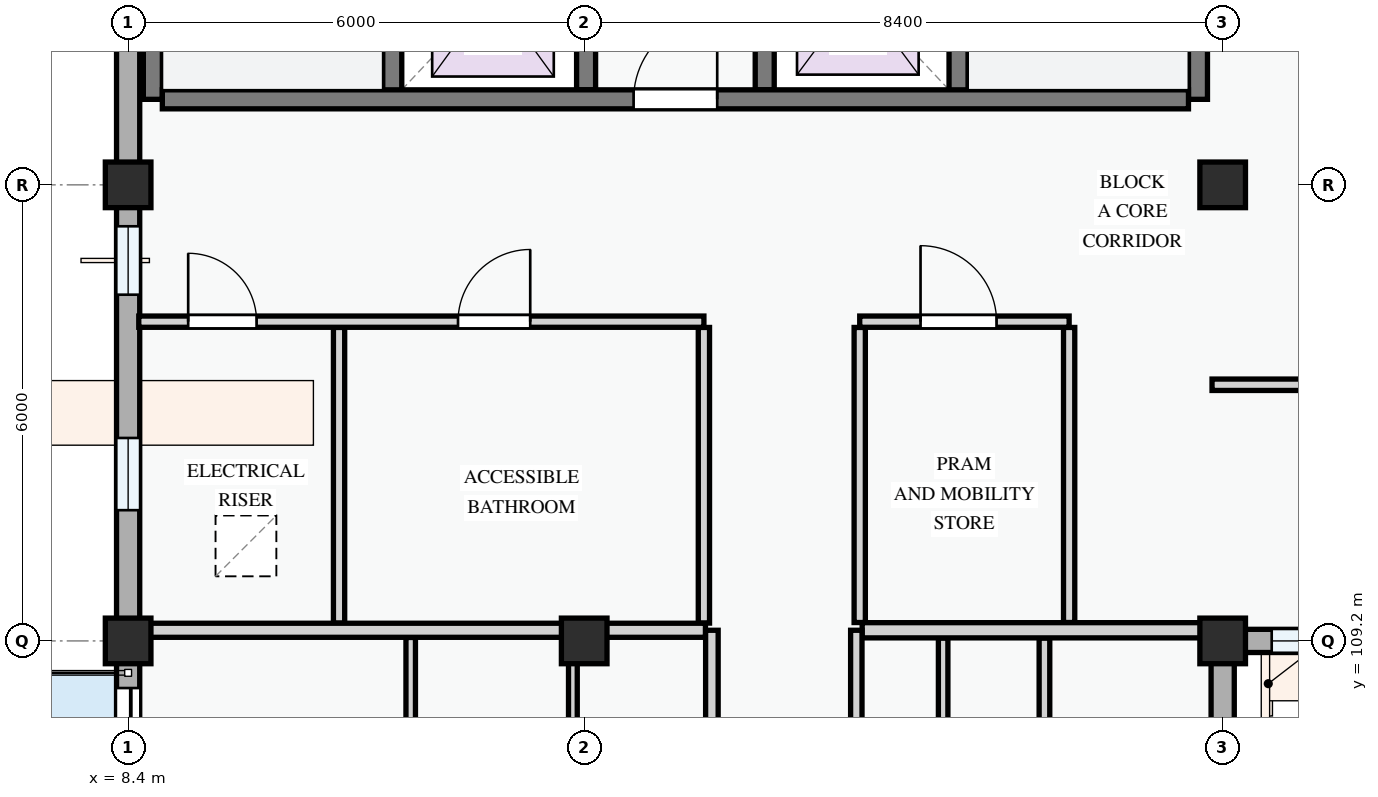
"""IFC4 building model, lengths in metres.
Left out: names, types, materials, properties, quantities, classifications, styles, units other than length and angle.
Written with IfcOpenShell. Run it as: python <this file> out.ifc"""

import sys

from ifc_helpers import new_model, si_unit, direction, frame, frame_2d, origin, origin_2d, place, context, subcontext, project, spatial, rectangle, extrude, element, fill, save


model = new_model("IFC4")
c1 = context("Model", 3, precision=1e-05, world=origin(), true_north=direction((0.0, 1.0)))
c2 = subcontext(c1, "Body", "Model", "MODEL_VIEW")
j1 = project(units=[si_unit("LENGTHUNIT", "METRE"), si_unit("PLANEANGLEUNIT", "RADIAN")], contexts=[c1])
p1 = place(None, origin())
s1 = spatial("IfcSite", under=j1, at=p1, CompositionType="ELEMENT")
p2 = place(p1, origin())
s2 = spatial("IfcBuilding", under=s1, at=p2, CompositionType="ELEMENT")
p3 = place(p2, frame((0.0, 0.0, 24.6)))
s3 = spatial("IfcBuildingStorey", under=s2, at=p3, CompositionType="ELEMENT", Elevation=24.6)
for number, where, z_axis, x_axis in (
    (1, (8.4, 109.2, 0.0), (0.0, 0.0, 1.0), (1.0, 0.0, 0.0)),
    (2, (8.4, 115.2, 0.0), (0.0, 0.0, 1.0), (1.0, 0.0, 0.0)),
    (3, (14.4, 109.2, 0.0), (0.0, 0.0, 1.0), (1.0, 0.0, 0.0)),
    (4, (22.8, 109.2, 0.0), (0.0, 0.0, 1.0), (1.0, 0.0, 0.0)),
    (5, (22.8, 115.2, 0.0), (0.0, 0.0, 1.0), (1.0, 0.0, 0.0)),
):
    element("IfcColumn", number, at=place(p3, frame(where, z_axis=z_axis, x_axis=x_axis)), inside=s3, PredefinedType="COLUMN", context=c2, shape_type="SweptSolid", body=[
        extrude(rectangle(XDim=0.6, YDim=0.6, at=origin_2d()), origin(), (0.0, 0.0, 1.0), 3.3),
    ])
p4 = place(p3, frame((22.8, 109.2, 0.0), z_axis=(0.0, 0.0, 1.0), x_axis=(1.0, 0.0, 0.0)))
e6 = element("IfcWall", 6, at=p4, inside=s3, PredefinedType="STANDARD", context=c2, shape_type="SweptSolid", body=[
    extrude(rectangle(XDim=6.0, YDim=0.305, at=frame_2d((3.0, 0.0))), origin(), (0.0, 0.0, 1.0), 2.475),
])
p5 = place(p4, frame((0.645, 0.0, 0.78)))
e7 = element("IfcOpeningElement", 7, at=p5, cuts=e6, PredefinedType="OPENING", context=c2, shape_type="SweptSolid", body=[
    extrude(rectangle(XDim=1.25, YDim=1.45, at=frame_2d((0.625, 0.725))), frame((0.0, 0.163, 0.0), z_axis=(0.0, -1.0, 0.0), x_axis=(1.0, 0.0, 0.0)), (0.0, 0.0, 1.0), 0.325),
])
p6 = place(p4, frame((2.87, 0.0, 0.78)))
e8 = element("IfcOpeningElement", 8, at=p6, cuts=e6, PredefinedType="OPENING", context=c2, shape_type="SweptSolid", body=[
    extrude(rectangle(XDim=2.42, YDim=1.52, at=frame_2d((1.21, 0.76))), frame((0.0, 0.163, 0.0), z_axis=(0.0, -1.0, 0.0), x_axis=(1.0, 0.0, 0.0)), (0.0, 0.0, 1.0), 0.325),
])
p7 = place(p3, frame((8.4, 123.6, 0.0), z_axis=(0.0, 0.0, 1.0), x_axis=(0.0, -1.0, 0.0)))
e9 = element("IfcWall", 9, at=p7, inside=s3, PredefinedType="STANDARD", context=c2, shape_type="SweptSolid", body=[
    extrude(rectangle(XDim=8.4, YDim=0.305, at=frame_2d((4.2, 0.0))), origin(), (0.0, 0.0, 1.0), 2.425),
])
p8 = place(p7, frame((1.236, 0.0, 0.78)))
e10 = element("IfcOpeningElement", 10, at=p8, cuts=e9, PredefinedType="OPENING", context=c2, shape_type="SweptSolid", body=[
    extrude(rectangle(XDim=1.52, YDim=1.42, at=frame_2d((0.76, 0.71))), frame((0.0, 0.163, 0.0), z_axis=(0.0, -1.0, 0.0), x_axis=(1.0, 0.0, 0.0)), (0.0, 0.0, 1.0), 0.325),
])
p9 = place(p7, frame((4.529, 0.0, 0.78)))
e11 = element("IfcOpeningElement", 11, at=p9, cuts=e9, PredefinedType="OPENING", context=c2, shape_type="SweptSolid", body=[
    extrude(rectangle(XDim=1.88, YDim=1.52, at=frame_2d((0.94, 0.76))), frame((0.0, 0.163, 0.0), z_axis=(0.0, -1.0, 0.0), x_axis=(1.0, 0.0, 0.0)), (0.0, 0.0, 1.0), 0.325),
])
p10 = place(p3, frame((8.4, 115.2, 0.0), z_axis=(0.0, 0.0, 1.0), x_axis=(0.0, -1.0, 0.0)))
e12 = element("IfcWall", 12, at=p10, inside=s3, PredefinedType="STANDARD", context=c2, shape_type="SweptSolid", body=[
    extrude(rectangle(XDim=6.0, YDim=0.305, at=frame_2d((3.0, 0.0))), origin(), (0.0, 0.0, 1.0), 2.575),
])
p11 = place(p10, frame((0.545, 0.0, 0.78)))
e13 = element("IfcOpeningElement", 13, at=p11, cuts=e12, PredefinedType="OPENING", context=c2, shape_type="SweptSolid", body=[
    extrude(rectangle(XDim=0.9, YDim=1.2, at=frame_2d((0.45, 0.6))), frame((0.0, 0.163, 0.0), z_axis=(0.0, -1.0, 0.0), x_axis=(1.0, 0.0, 0.0)), (0.0, 0.0, 1.0), 0.325),
])
p12 = place(p10, frame((3.33, 0.0, 0.78)))
e14 = element("IfcOpeningElement", 14, at=p12, cuts=e12, PredefinedType="OPENING", context=c2, shape_type="SweptSolid", body=[
    extrude(rectangle(XDim=0.95, YDim=1.15, at=frame_2d((0.475, 0.575))), frame((0.0, 0.163, 0.0), z_axis=(0.0, -1.0, 0.0), x_axis=(1.0, 0.0, 0.0)), (0.0, 0.0, 1.0), 0.325),
])
p13 = place(p3, frame((8.4, 109.2, 0.0), z_axis=(0.0, 0.0, 1.0), x_axis=(0.0, -1.0, 0.0)))
e15 = element("IfcWall", 15, at=p13, inside=s3, PredefinedType="STANDARD", context=c2, shape_type="SweptSolid", body=[
    extrude(rectangle(XDim=8.4, YDim=0.305, at=frame_2d((4.2, 0.0))), origin(), (0.0, 0.0, 1.0), 2.425),
])
p14 = place(p13, frame((0.62, 0.0, 0.0)))
e16 = element("IfcOpeningElement", 16, at=p14, cuts=e15, PredefinedType="OPENING", context=c2, shape_type="SweptSolid", body=[
    extrude(rectangle(XDim=1.4, YDim=2.2, at=frame_2d((0.7, 1.1))), frame((0.0, 0.163, 0.0), z_axis=(0.0, -1.0, 0.0), x_axis=(1.0, 0.0, 0.0)), (0.0, 0.0, 1.0), 0.325),
])
p15 = place(p13, frame((2.532, 0.0, 0.78)))
e17 = element("IfcOpeningElement", 17, at=p15, cuts=e15, PredefinedType="OPENING", context=c2, shape_type="SweptSolid", body=[
    extrude(rectangle(XDim=2.0, YDim=1.5, at=frame_2d((1.0, 0.75))), frame((0.0, 0.163, 0.0), z_axis=(0.0, -1.0, 0.0), x_axis=(1.0, 0.0, 0.0)), (0.0, 0.0, 1.0), 0.325),
])
p16 = place(p13, frame((5.393, 0.0, 0.78)))
e18 = element("IfcOpeningElement", 18, at=p16, cuts=e15, PredefinedType="OPENING", context=c2, shape_type="SweptSolid", body=[
    extrude(rectangle(XDim=2.42, YDim=1.52, at=frame_2d((1.21, 0.76))), frame((0.0, 0.163, 0.0), z_axis=(0.0, -1.0, 0.0), x_axis=(1.0, 0.0, 0.0)), (0.0, 0.0, 1.0), 0.325),
])
p17 = place(p3, frame((22.8, 100.8, 0.0), z_axis=(0.0, 0.0, 1.0), x_axis=(0.0, 1.0, 0.0)))
e19 = element("IfcWall", 19, at=p17, inside=s3, PredefinedType="STANDARD", context=c2, shape_type="SweptSolid", body=[
    extrude(rectangle(XDim=8.4, YDim=0.305, at=frame_2d((4.2, 0.0))), origin(), (0.0, 0.0, 1.0), 2.425),
])
p18 = place(p17, frame((1.145, 0.0, 0.78)))
e20 = element("IfcOpeningElement", 20, at=p18, cuts=e19, PredefinedType="OPENING", context=c2, shape_type="SweptSolid", body=[
    extrude(rectangle(XDim=1.1, YDim=1.3, at=frame_2d((0.55, 0.65))), frame((0.0, 0.163, 0.0), z_axis=(0.0, -1.0, 0.0), x_axis=(1.0, 0.0, 0.0)), (0.0, 0.0, 1.0), 0.325),
])
p19 = place(p17, frame((3.647, 0.0, 0.78)))
e21 = element("IfcOpeningElement", 21, at=p19, cuts=e19, PredefinedType="OPENING", context=c2, shape_type="SweptSolid", body=[
    extrude(rectangle(XDim=1.68, YDim=1.46, at=frame_2d((0.84, 0.73))), frame((0.0, 0.163, 0.0), z_axis=(0.0, -1.0, 0.0), x_axis=(1.0, 0.0, 0.0)), (0.0, 0.0, 1.0), 0.325),
])
p20 = place(p17, frame((6.472, 0.0, 0.78)))
e22 = element("IfcOpeningElement", 22, at=p20, cuts=e19, PredefinedType="OPENING", context=c2, shape_type="SweptSolid", body=[
    extrude(rectangle(XDim=0.9, YDim=1.2, at=frame_2d((0.45, 0.6))), frame((0.0, 0.163, 0.0), z_axis=(0.0, -1.0, 0.0), x_axis=(1.0, 0.0, 0.0)), (0.0, 0.0, 1.0), 0.325),
])
p21 = place(p3, frame((11.875, 123.25, 0.0), z_axis=(0.0, 0.0, 1.0), x_axis=(0.0, -1.0, 0.0)))
e23 = element("IfcWall", 23, at=p21, inside=s3, PredefinedType="SHEAR", context=c2, shape_type="SweptSolid", body=[
    extrude(rectangle(XDim=6.925, YDim=0.25, at=frame_2d((3.462, 0.0))), origin(), (0.0, 0.0, 1.0), 3.0),
])
p22 = place(p21, frame((0.35, 0.0, 0.0)))
e24 = element("IfcOpeningElement", 24, at=p22, cuts=e23, PredefinedType="OPENING", context=c2, shape_type="SweptSolid", body=[
    extrude(rectangle(XDim=0.95, YDim=2.1, at=frame_2d((0.475, 1.05))), frame((0.0, 0.135, 0.0), z_axis=(0.0, -1.0, 0.0), x_axis=(1.0, 0.0, 0.0)), (0.0, 0.0, 1.0), 0.27),
])
p23 = place(p3, frame((8.725, 123.4, 0.0), z_axis=(0.0, 0.0, 1.0), x_axis=(0.0, -1.0, 0.0)))
e25 = element("IfcWall", 25, at=p23, inside=s3, PredefinedType="SHEAR", context=c2, shape_type="SweptSolid", body=[
    extrude(rectangle(XDim=7.075, YDim=0.25, at=frame_2d((3.538, 0.0))), origin(), (0.0, 0.0, 1.0), 3.0),
])
p24 = place(p3, frame((22.475, 123.25, 0.0), z_axis=(0.0, 0.0, 1.0), x_axis=(0.0, -1.0, 0.0)))
e26 = element("IfcWall", 26, at=p24, inside=s3, PredefinedType="SHEAR", context=c2, shape_type="SweptSolid", body=[
    extrude(rectangle(XDim=6.925, YDim=0.25, at=frame_2d((3.462, 0.0))), origin(), (0.0, 0.0, 1.0), 3.0),
])
p25 = place(p3, frame((19.325, 123.25, 0.0), z_axis=(0.0, 0.0, 1.0), x_axis=(0.0, -1.0, 0.0)))
e27 = element("IfcWall", 27, at=p25, inside=s3, PredefinedType="SHEAR", context=c2, shape_type="SweptSolid", body=[
    extrude(rectangle(XDim=6.925, YDim=0.25, at=frame_2d((3.462, 0.0))), origin(), (0.0, 0.0, 1.0), 3.0),
])
p26 = place(p25, frame((0.35, 0.0, 0.0)))
e28 = element("IfcOpeningElement", 28, at=p26, cuts=e27, PredefinedType="OPENING", context=c2, shape_type="SweptSolid", body=[
    extrude(rectangle(XDim=0.95, YDim=2.1, at=frame_2d((0.475, 1.05))), frame((0.0, 0.135, 0.0), z_axis=(0.0, -1.0, 0.0), x_axis=(1.0, 0.0, 0.0)), (0.0, 0.0, 1.0), 0.27),
])
for number, where, z_axis, x_axis in (
    (29, (14.425, 118.875, 0.0), (0.0, 0.0, 1.0), (0.0, -1.0, 0.0)),
    (30, (16.775, 118.875, 0.0), (0.0, 0.0, 1.0), (0.0, -1.0, 0.0)),
):
    element("IfcWall", number, at=place(p3, frame(where, z_axis=z_axis, x_axis=x_axis)), inside=s3, PredefinedType="SHEAR", context=c2, shape_type="SweptSolid", body=[
        extrude(rectangle(XDim=2.425, YDim=0.25, at=frame_2d((1.212, 0.0))), origin(), (0.0, 0.0, 1.0), 3.0),
    ])
p27 = place(p3, frame((8.85, 116.325, 0.0), z_axis=(0.0, 0.0, 1.0), x_axis=(1.0, 0.0, 0.0)))
e31 = element("IfcWall", 31, at=p27, inside=s3, PredefinedType="SHEAR", context=c2, shape_type="SweptSolid", body=[
    extrude(rectangle(XDim=13.5, YDim=0.25, at=frame_2d((6.75, 0.0))), origin(), (0.0, 0.0, 1.0), 3.0),
])
p28 = place(p27, frame((6.2, 0.0, 0.0)))
e32 = element("IfcOpeningElement", 32, at=p28, cuts=e31, PredefinedType="OPENING", context=c2, shape_type="SweptSolid", body=[
    extrude(rectangle(XDim=1.1, YDim=2.15, at=frame_2d((0.55, 1.075))), frame((0.0, 0.135, 0.0), z_axis=(0.0, -1.0, 0.0), x_axis=(1.0, 0.0, 0.0)), (0.0, 0.0, 1.0), 0.27),
])
for number, where, z_axis, x_axis in (
    (33, (11.175, 113.324, 0.0), (0.0, 0.0, 1.0), (0.0, -1.0, 0.0)),
    (34, (15.975, 113.324, 0.0), (0.0, 0.0, 1.0), (0.0, -1.0, 0.0)),
):
    element("IfcWall", number, at=place(p3, frame(where, z_axis=z_axis, x_axis=x_axis)), inside=s3, PredefinedType="PARTITIONING", context=c2, shape_type="SweptSolid", body=[
        extrude(rectangle(XDim=3.889, YDim=0.148, at=frame_2d((1.945, 0.0))), origin(), (0.0, 0.0, 1.0), 3.0),
    ])
for number, where, z_axis, x_axis in (
    (35, (18.025, 113.324, 0.0), (0.0, 0.0, 1.0), (0.0, -1.0, 0.0)),
    (36, (20.78, 113.324, 0.0), (0.0, 0.0, 1.0), (0.0, -1.0, 0.0)),
):
    element("IfcWall", number, at=place(p3, frame(where, z_axis=z_axis, x_axis=x_axis)), inside=s3, PredefinedType="PARTITIONING", context=c2, shape_type="SweptSolid", body=[
        extrude(rectangle(XDim=3.882, YDim=0.148, at=frame_2d((1.941, 0.0))), origin(), (0.0, 0.0, 1.0), 3.0),
    ])
p29 = place(p3, frame((8.54, 113.4, 0.0), z_axis=(0.0, 0.0, 1.0), x_axis=(1.0, 0.0, 0.0)))
e37 = element("IfcWall", 37, at=p29, inside=s3, PredefinedType="PARTITIONING", context=c2, shape_type="SweptSolid", body=[
    extrude(rectangle(XDim=7.435, YDim=0.148, at=frame_2d((3.718, 0.0))), origin(), (0.0, 0.0, 1.0), 3.0),
])
p30 = place(p29, frame((0.65, 0.0, 0.0)))
e38 = element("IfcOpeningElement", 38, at=p30, cuts=e37, PredefinedType="OPENING", context=c2, shape_type="SweptSolid", body=[
    extrude(rectangle(XDim=0.9, YDim=2.1, at=frame_2d((0.45, 1.05))), frame((0.0, 0.084, 0.0), z_axis=(0.0, -1.0, 0.0), x_axis=(1.0, 0.0, 0.0)), (0.0, 0.0, 1.0), 0.168),
])
p31 = place(p29, frame((4.2, 0.0, 0.0)))
e39 = element("IfcOpeningElement", 39, at=p31, cuts=e37, PredefinedType="OPENING", context=c2, shape_type="SweptSolid", body=[
    extrude(rectangle(XDim=0.95, YDim=2.1, at=frame_2d((0.475, 1.05))), frame((0.0, 0.084, 0.0), z_axis=(0.0, -1.0, 0.0), x_axis=(1.0, 0.0, 0.0)), (0.0, 0.0, 1.0), 0.168),
])
p32 = place(p3, frame((18.025, 113.4, 0.0), z_axis=(0.0, 0.0, 1.0), x_axis=(1.0, 0.0, 0.0)))
e40 = element("IfcWall", 40, at=p32, inside=s3, PredefinedType="PARTITIONING", context=c2, shape_type="SweptSolid", body=[
    extrude(rectangle(XDim=2.755, YDim=0.148, at=frame_2d((1.377, 0.0))), origin(), (0.0, 0.0, 1.0), 3.0),
])
p33 = place(p32, frame((0.8, 0.0, 0.0)))
e41 = element("IfcOpeningElement", 41, at=p33, cuts=e40, PredefinedType="OPENING", context=c2, shape_type="SweptSolid", body=[
    extrude(rectangle(XDim=1.0, YDim=2.15, at=frame_2d((0.5, 1.075))), frame((0.0, 0.084, 0.0), z_axis=(0.0, -1.0, 0.0), x_axis=(1.0, 0.0, 0.0)), (0.0, 0.0, 1.0), 0.168),
])
p34 = place(p3, frame((22.66, 112.57, 0.0), z_axis=(0.0, 0.0, 1.0), x_axis=(1.0, 0.0, 0.0)))
e42 = element("IfcWall", 42, at=p34, inside=s3, PredefinedType="PARTITIONING", context=c2, shape_type="SweptSolid", body=[
    extrude(rectangle(XDim=2.406, YDim=0.15, at=frame_2d((1.203, 0.0))), origin(), (0.0, 0.0, 1.0), 3.0),
])
p35 = place(p3, frame((12.118, 104.277, 0.0), z_axis=(0.0, 0.0, 1.0), x_axis=(0.0, 1.0, 0.0)))
e43 = element("IfcWall", 43, at=p35, inside=s3, PredefinedType="PARTITIONING", context=c2, shape_type="SweptSolid", body=[
    extrude(rectangle(XDim=4.969, YDim=0.125, at=frame_2d((2.484, 0.0))), origin(), (0.0, 0.0, 1.0), 3.0),
])
p36 = place(p3, frame((14.251, 104.277, 0.0), z_axis=(0.0, 0.0, 1.0), x_axis=(0.0, 1.0, 0.0)))
e44 = element("IfcWall", 44, at=p36, inside=s3, PredefinedType="PARTITIONING", context=c2, shape_type="SweptSolid", body=[
    extrude(rectangle(XDim=4.969, YDim=0.115, at=frame_2d((2.484, 0.0))), origin(), (0.0, 0.0, 1.0), 2.425),
])
p37 = place(p3, frame((20.455, 104.052, 0.0), z_axis=(0.0, 0.0, 1.0), x_axis=(0.0, 1.0, 0.0)))
e45 = element("IfcWall", 45, at=p37, inside=s3, PredefinedType="PARTITIONING", context=c2, shape_type="SweptSolid", body=[
    extrude(rectangle(XDim=5.187, YDim=0.14, at=frame_2d((2.593, 0.0))), origin(), (0.0, 0.0, 1.0), 3.0),
])
p38 = place(p3, frame((19.122, 104.052, 0.0), z_axis=(0.0, 0.0, 1.0), x_axis=(0.0, 1.0, 0.0)))
e46 = element("IfcWall", 46, at=p38, inside=s3, PredefinedType="PARTITIONING", context=c2, shape_type="SweptSolid", body=[
    extrude(rectangle(XDim=5.187, YDim=0.125, at=frame_2d((2.593, 0.0))), origin(), (0.0, 0.0, 1.0), 3.0),
])
p39 = place(p3, frame((8.554, 109.34, 0.0), z_axis=(0.0, 0.0, 1.0), x_axis=(1.0, 0.0, 0.0)))
e47 = element("IfcWall", 47, at=p39, inside=s3, PredefinedType="PARTITIONING", context=c2, shape_type="SweptSolid", body=[
    extrude(rectangle(XDim=7.441, YDim=0.185, at=frame_2d((3.721, 0.0))), origin(), (0.0, 0.0, 1.0), 2.375),
])
p40 = place(p3, frame((18.057, 109.34, 0.0), z_axis=(0.0, 0.0, 1.0), x_axis=(1.0, 0.0, 0.0)))
e48 = element("IfcWall", 48, at=p40, inside=s3, PredefinedType="PARTITIONING", context=c2, shape_type="SweptSolid", body=[
    extrude(rectangle(XDim=4.683, YDim=0.2, at=frame_2d((2.342, 0.0))), origin(), (0.0, 0.0, 1.0), 2.375),
])
p41 = place(p3, frame((16.08, 86.46, 0.0), z_axis=(0.0, 0.0, 1.0), x_axis=(0.0, 1.0, 0.0)))
e49 = element("IfcWall", 49, at=p41, inside=s3, PredefinedType="PARTITIONING", context=c2, shape_type="SweptSolid", body=[
    extrude(rectangle(XDim=22.88, YDim=0.165, at=frame_2d((11.44, 0.0))), origin(), (0.0, 0.0, 1.0), 3.0),
])
p42 = place(p41, frame((3.732, 0.0, 0.0)))
e50 = element("IfcOpeningElement", 50, at=p42, cuts=e49, PredefinedType="OPENING", context=c2, shape_type="SweptSolid", body=[
    extrude(rectangle(XDim=0.92, YDim=2.1, at=frame_2d((0.46, 1.05))), frame((0.0, 0.093, 0.0), z_axis=(0.0, -1.0, 0.0), x_axis=(1.0, 0.0, 0.0)), (0.0, 0.0, 1.0), 0.185),
])
p43 = place(p41, frame((16.535, 0.0, 0.0)))
e51 = element("IfcOpeningElement", 51, at=p43, cuts=e49, PredefinedType="OPENING", context=c2, shape_type="SweptSolid", body=[
    extrude(rectangle(XDim=0.92, YDim=2.1, at=frame_2d((0.46, 1.05))), frame((0.0, 0.093, 0.0), z_axis=(0.0, -1.0, 0.0), x_axis=(1.0, 0.0, 0.0)), (0.0, 0.0, 1.0), 0.185),
])
p44 = place(p3, frame((17.98, 86.46, 0.0), z_axis=(0.0, 0.0, 1.0), x_axis=(0.0, 1.0, 0.0)))
e52 = element("IfcWall", 52, at=p44, inside=s3, PredefinedType="PARTITIONING", context=c2, shape_type="SweptSolid", body=[
    extrude(rectangle(XDim=22.88, YDim=0.15, at=frame_2d((11.44, 0.0))), origin(), (0.0, 0.0, 1.0), 3.0),
])
p45 = place(p44, frame((3.695, 0.0, 0.0)))
e53 = element("IfcOpeningElement", 53, at=p45, cuts=e52, PredefinedType="OPENING", context=c2, shape_type="SweptSolid", body=[
    extrude(rectangle(XDim=0.92, YDim=2.1, at=frame_2d((0.46, 1.05))), frame((0.0, 0.085, 0.0), z_axis=(0.0, -1.0, 0.0), x_axis=(1.0, 0.0, 0.0)), (0.0, 0.0, 1.0), 0.17),
])
p46 = place(p44, frame((16.33, 0.0, 0.0)))
e54 = element("IfcOpeningElement", 54, at=p46, cuts=e52, PredefinedType="OPENING", context=c2, shape_type="SweptSolid", body=[
    extrude(rectangle(XDim=0.92, YDim=2.1, at=frame_2d((0.46, 1.05))), frame((0.0, 0.085, 0.0), z_axis=(0.0, -1.0, 0.0), x_axis=(1.0, 0.0, 0.0)), (0.0, 0.0, 1.0), 0.17),
])
p47 = place(p5, origin())
e55 = element("IfcWindow", 55, at=p47, inside=s3, PartitioningType="SINGLE_PANEL", PredefinedType="WINDOW", context=c2, shape_type="SweptSolid", body=[
    extrude(rectangle(XDim=1.25, YDim=1.45, at=frame_2d((0.625, 0.725))), frame((0.0, 0.03, 0.0), z_axis=(0.0, -1.0, 0.0), x_axis=(1.0, 0.0, 0.0)), (0.0, 0.0, 1.0), 0.06),
])
fill(e7, e55)
p48 = place(p11, origin())
e56 = element("IfcWindow", 56, at=p48, inside=s3, PartitioningType="SINGLE_PANEL", PredefinedType="WINDOW", context=c2, shape_type="SweptSolid", body=[
    extrude(rectangle(XDim=0.9, YDim=1.2, at=frame_2d((0.45, 0.6))), frame((0.0, 0.03, 0.0), z_axis=(0.0, -1.0, 0.0), x_axis=(1.0, 0.0, 0.0)), (0.0, 0.0, 1.0), 0.06),
])
fill(e13, e56)
p49 = place(p12, origin())
e57 = element("IfcWindow", 57, at=p49, inside=s3, PartitioningType="SINGLE_PANEL", PredefinedType="WINDOW", context=c2, shape_type="SweptSolid", body=[
    extrude(rectangle(XDim=0.95, YDim=1.15, at=frame_2d((0.475, 0.575))), frame((0.0, 0.03, 0.0), z_axis=(0.0, -1.0, 0.0), x_axis=(1.0, 0.0, 0.0)), (0.0, 0.0, 1.0), 0.06),
])
fill(e14, e57)
p50 = place(p14, frame((1.4, 0.0, 0.0), z_axis=(0.0, 0.0, 1.0), x_axis=(-1.0, 0.0, 0.0)))
e58 = element("IfcDoor", 58, at=p50, inside=s3, OperationType="SLIDING_TO_LEFT", PredefinedType="DOOR", context=c2, shape_type="SweptSolid", body=[
    extrude(rectangle(XDim=1.4, YDim=2.2, at=frame_2d((0.7, 1.1))), frame((0.0, 0.025, 0.0), z_axis=(0.0, -1.0, 0.0), x_axis=(1.0, 0.0, 0.0)), (0.0, 0.0, 1.0), 0.05),
])
fill(e16, e58)
p51 = place(p28, origin())
e59 = element("IfcDoor", 59, at=p51, inside=s3, OperationType="SINGLE_SWING_RIGHT", PredefinedType="DOOR", context=c2, shape_type="SweptSolid", body=[
    extrude(rectangle(XDim=1.1, YDim=2.15, at=frame_2d((0.55, 1.075))), frame((0.0, 0.025, 0.0), z_axis=(0.0, -1.0, 0.0), x_axis=(1.0, 0.0, 0.0)), (0.0, 0.0, 1.0), 0.05),
])
fill(e32, e59)
p52 = place(p30, origin())
e60 = element("IfcDoor", 60, at=p52, inside=s3, OperationType="SINGLE_SWING_LEFT", PredefinedType="DOOR", context=c2, shape_type="SweptSolid", body=[
    extrude(rectangle(XDim=0.9, YDim=2.1, at=frame_2d((0.45, 1.05))), frame((0.0, 0.025, 0.0), z_axis=(0.0, -1.0, 0.0), x_axis=(1.0, 0.0, 0.0)), (0.0, 0.0, 1.0), 0.05),
])
fill(e38, e60)
p53 = place(p31, origin())
e61 = element("IfcDoor", 61, at=p53, inside=s3, OperationType="SINGLE_SWING_RIGHT", PredefinedType="DOOR", context=c2, shape_type="SweptSolid", body=[
    extrude(rectangle(XDim=0.95, YDim=2.1, at=frame_2d((0.475, 1.05))), frame((0.0, 0.025, 0.0), z_axis=(0.0, -1.0, 0.0), x_axis=(1.0, 0.0, 0.0)), (0.0, 0.0, 1.0), 0.05),
])
fill(e39, e61)
p54 = place(p33, origin())
e62 = element("IfcDoor", 62, at=p54, inside=s3, OperationType="SINGLE_SWING_LEFT", PredefinedType="DOOR", context=c2, shape_type="SweptSolid", body=[
    extrude(rectangle(XDim=1.0, YDim=2.15, at=frame_2d((0.5, 1.075))), frame((0.0, 0.025, 0.0), z_axis=(0.0, -1.0, 0.0), x_axis=(1.0, 0.0, 0.0)), (0.0, 0.0, 1.0), 0.05),
])
fill(e41, e62)
save(model, sys.argv[1])
